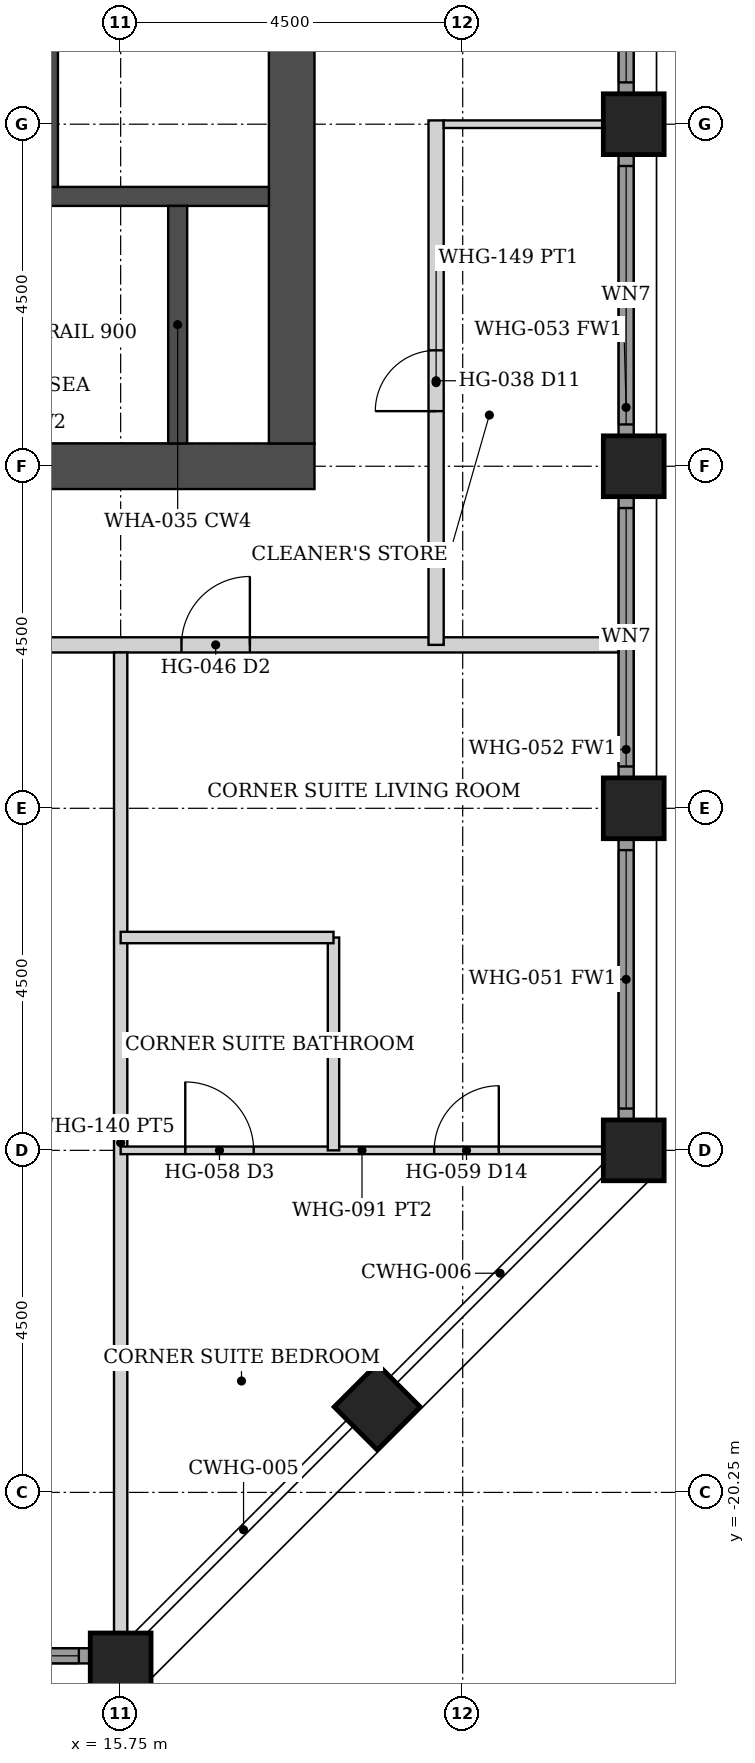
"""IFC4 building model, lengths in metres.
Left out: names, types, materials, properties, quantities, classifications, styles, units other than length and angle.
Written with IfcOpenShell. Run it as: python <this file> out.ifc"""

import sys

from ifc_helpers import new_model, si_unit, direction, frame, frame_2d, origin, origin_2d, place, context, subcontext, project, spatial, rectangle, hollow_rectangle, extrude, element, fill, save


model = new_model("IFC4")
c1 = context("Model", 3, precision=1e-05, world=origin(), true_north=direction((0.0, 1.0)))
c2 = subcontext(c1, "Body", "Model", "MODEL_VIEW")
j1 = project(units=[si_unit("LENGTHUNIT", "METRE"), si_unit("PLANEANGLEUNIT", "RADIAN")], contexts=[c1])
p1 = place(None, origin())
s1 = spatial("IfcSite", under=j1, at=p1, CompositionType="ELEMENT")
p2 = place(p1, origin())
s2 = spatial("IfcBuilding", under=s1, at=p2, CompositionType="ELEMENT")
p3 = place(p2, frame((0.0, 0.0, 186.8)))
s3 = spatial("IfcBuildingStorey", under=s2, at=p3, CompositionType="ELEMENT", Elevation=186.8)
for number, where, z_axis, x_axis in (
    (1, (22.5, -15.75, 0.0), (0.0, 0.0, 1.0), (1.0, 0.0, 0.0)),
    (2, (22.5, -11.25, 0.0), (0.0, 0.0, 1.0), (1.0, 0.0, 0.0)),
    (3, (22.5, -6.75, 0.0), (0.0, 0.0, 1.0), (1.0, 0.0, 0.0)),
    (4, (22.5, -2.25, 0.0), (0.0, 0.0, 1.0), (1.0, 0.0, 0.0)),
    (5, (15.75, -22.5, 0.0), (0.0, 0.0, 1.0), (0.0, 1.0, 0.0)),
    (6, (19.125, -19.125, 0.0), (0.0, 0.0, 1.0), (0.707, -0.707, 0.0)),
):
    element("IfcColumn", number, at=place(p3, frame(where, z_axis=z_axis, x_axis=x_axis)), inside=s3, PredefinedType="COLUMN", context=c2, shape_type="SweptSolid", body=[
        extrude(hollow_rectangle(XDim=0.8, YDim=0.8, WallThickness=0.045, at=origin_2d()), origin(), (0.0, 0.0, 1.0), 3.6),
    ])
p4 = place(p3, frame((8.7, -6.75, 0.0), z_axis=(0.0, 0.0, 1.0), x_axis=(1.0, 0.0, 0.0)))
e7 = element("IfcWall", 7, at=p4, inside=s3, PredefinedType="SHEAR", context=c2, shape_type="SweptSolid", body=[
    extrude(rectangle(XDim=9.6, YDim=0.6, at=frame_2d((4.8, 0.0))), origin(), (0.0, 0.0, 1.0), 3.6),
])
p5 = place(p3, frame((18.0, -6.45, 0.0), z_axis=(0.0, 0.0, 1.0), x_axis=(0.0, 1.0, 0.0)))
e8 = element("IfcWall", 8, at=p5, inside=s3, PredefinedType="SHEAR", context=c2, shape_type="SweptSolid", body=[
    extrude(rectangle(XDim=12.9, YDim=0.6, at=frame_2d((6.45, 0.0))), origin(), (0.0, 0.0, 1.0), 3.6),
])
p6 = place(p3, frame((9.3, -3.2, 0.0), z_axis=(0.0, 0.0, 1.0), x_axis=(1.0, 0.0, 0.0)))
e9 = element("IfcWall", 9, at=p6, inside=s3, PredefinedType="SHEAR", context=c2, shape_type="SweptSolid", body=[
    extrude(rectangle(XDim=8.4, YDim=0.25, at=frame_2d((4.2, 0.0))), origin(), (0.0, 0.0, 1.0), 3.6),
])
p7 = place(p6, frame((0.15, 0.0, 0.0)))
e10 = element("IfcOpeningElement", 10, at=p7, cuts=e9, PredefinedType="OPENING", context=c2, shape_type="SweptSolid", body=[
    extrude(rectangle(XDim=1.0, YDim=2.1, at=frame_2d((0.5, 1.05))), frame((0.0, 0.135, 0.0), z_axis=(0.0, -1.0, 0.0), x_axis=(1.0, 0.0, 0.0)), (0.0, 0.0, 1.0), 0.27),
])
p8 = place(p3, frame((16.5, -6.45, 0.0), z_axis=(0.0, 0.0, 1.0), x_axis=(0.0, 1.0, 0.0)))
e11 = element("IfcWall", 11, at=p8, inside=s3, PredefinedType="SHEAR", context=c2, shape_type="SweptSolid", body=[
    extrude(rectangle(XDim=3.125, YDim=0.25, at=frame_2d((1.562, 0.0))), origin(), (0.0, 0.0, 1.0), 3.6),
])
p9 = place(p3, frame((14.8, -3.075, 0.0), z_axis=(0.0, 0.0, 1.0), x_axis=(0.0, 1.0, 0.0)))
e12 = element("IfcWall", 12, at=p9, inside=s3, PredefinedType="SHEAR", context=c2, shape_type="SweptSolid", body=[
    extrude(rectangle(XDim=6.15, YDim=0.25, at=frame_2d((3.075, 0.0))), origin(), (0.0, 0.0, 1.0), 3.6),
])
p10 = place(p9, frame((2.4, 0.0, 0.0)))
e13 = element("IfcOpeningElement", 13, at=p10, cuts=e12, PredefinedType="OPENING", context=c2, shape_type="SweptSolid", body=[
    extrude(rectangle(XDim=1.1, YDim=2.1, at=frame_2d((0.55, 1.05))), frame((0.0, 0.135, 0.0), z_axis=(0.0, -1.0, 0.0), x_axis=(1.0, 0.0, 0.0)), (0.0, 0.0, 1.0), 0.27),
])
p11 = place(p9, frame((4.575, 0.0, 0.0)))
e14 = element("IfcOpeningElement", 14, at=p11, cuts=e12, PredefinedType="OPENING", context=c2, shape_type="SweptSolid", body=[
    extrude(rectangle(XDim=1.1, YDim=2.1, at=frame_2d((0.55, 1.05))), frame((0.0, 0.135, 0.0), z_axis=(0.0, -1.0, 0.0), x_axis=(1.0, 0.0, 0.0)), (0.0, 0.0, 1.0), 0.27),
])
p12 = place(p3, frame((11.655, -22.4, 0.0), z_axis=(0.0, 0.0, 1.0), x_axis=(1.0, 0.0, 0.0)))
e15 = element("IfcWall", 15, at=p12, inside=s3, PredefinedType="SOLIDWALL", context=c2, shape_type="SweptSolid", body=[
    extrude(rectangle(XDim=3.69, YDim=0.2, at=frame_2d((1.845, 0.0))), origin(), (0.0, 0.0, 1.0), 2.379),
])
p13 = place(p12, frame((0.145, 0.0, 0.3)))
e16 = element("IfcOpeningElement", 16, at=p13, cuts=e15, PredefinedType="OPENING", context=c2, shape_type="SweptSolid", body=[
    extrude(rectangle(XDim=3.4, YDim=1.929, at=frame_2d((1.7, 0.964))), frame((0.0, 0.11, 0.0), z_axis=(0.0, -1.0, 0.0), x_axis=(1.0, 0.0, 0.0)), (0.0, 0.0, 1.0), 0.22),
])
p14 = place(p3, frame((22.4, -15.345, 0.0), z_axis=(0.0, 0.0, 1.0), x_axis=(0.0, 1.0, 0.0)))
e17 = element("IfcWall", 17, at=p14, inside=s3, PredefinedType="SOLIDWALL", context=c2, shape_type="SweptSolid", body=[
    extrude(rectangle(XDim=3.69, YDim=0.2, at=frame_2d((1.845, 0.0))), origin(), (0.0, 0.0, 1.0), 2.379),
])
p15 = place(p14, frame((0.145, 0.0, 0.3)))
e18 = element("IfcOpeningElement", 18, at=p15, cuts=e17, PredefinedType="OPENING", context=c2, shape_type="SweptSolid", body=[
    extrude(rectangle(XDim=3.4, YDim=1.929, at=frame_2d((1.7, 0.964))), frame((0.0, 0.11, 0.0), z_axis=(0.0, -1.0, 0.0), x_axis=(1.0, 0.0, 0.0)), (0.0, 0.0, 1.0), 0.22),
])
p16 = place(p3, frame((22.4, -10.845, 0.0), z_axis=(0.0, 0.0, 1.0), x_axis=(0.0, 1.0, 0.0)))
e19 = element("IfcWall", 19, at=p16, inside=s3, PredefinedType="SOLIDWALL", context=c2, shape_type="SweptSolid", body=[
    extrude(rectangle(XDim=3.69, YDim=0.2, at=frame_2d((1.845, 0.0))), origin(), (0.0, 0.0, 1.0), 2.379),
])
p17 = place(p16, frame((0.145, 0.0, 0.3)))
e20 = element("IfcOpeningElement", 20, at=p17, cuts=e19, PredefinedType="OPENING", context=c2, shape_type="SweptSolid", body=[
    extrude(rectangle(XDim=3.4, YDim=1.929, at=frame_2d((1.7, 0.964))), frame((0.0, 0.11, 0.0), z_axis=(0.0, -1.0, 0.0), x_axis=(1.0, 0.0, 0.0)), (0.0, 0.0, 1.0), 0.22),
])
p18 = place(p3, frame((22.4, -6.345, 0.0), z_axis=(0.0, 0.0, 1.0), x_axis=(0.0, 1.0, 0.0)))
e21 = element("IfcWall", 21, at=p18, inside=s3, PredefinedType="SOLIDWALL", context=c2, shape_type="SweptSolid", body=[
    extrude(rectangle(XDim=3.69, YDim=0.2, at=frame_2d((1.845, 0.0))), origin(), (0.0, 0.0, 1.0), 2.379),
])
p19 = place(p18, frame((0.145, 0.0, 0.3)))
e22 = element("IfcOpeningElement", 22, at=p19, cuts=e21, PredefinedType="OPENING", context=c2, shape_type="SweptSolid", body=[
    extrude(rectangle(XDim=3.4, YDim=1.929, at=frame_2d((1.7, 0.964))), frame((0.0, 0.11, 0.0), z_axis=(0.0, -1.0, 0.0), x_axis=(1.0, 0.0, 0.0)), (0.0, 0.0, 1.0), 0.22),
])
p20 = place(p3, frame((22.4, -1.845, 0.0), z_axis=(0.0, 0.0, 1.0), x_axis=(0.0, 1.0, 0.0)))
e23 = element("IfcWall", 23, at=p20, inside=s3, PredefinedType="SOLIDWALL", context=c2, shape_type="SweptSolid", body=[
    extrude(rectangle(XDim=3.69, YDim=0.2, at=frame_2d((1.845, 0.0))), origin(), (0.0, 0.0, 1.0), 2.379),
])
p21 = place(p20, frame((0.145, 0.0, 0.3)))
e24 = element("IfcOpeningElement", 24, at=p21, cuts=e23, PredefinedType="OPENING", context=c2, shape_type="SweptSolid", body=[
    extrude(rectangle(XDim=3.4, YDim=1.929, at=frame_2d((1.7, 0.964))), frame((0.0, 0.11, 0.0), z_axis=(0.0, -1.0, 0.0), x_axis=(1.0, 0.0, 0.0)), (0.0, 0.0, 1.0), 0.22),
])
p22 = place(p3, frame((-22.3, -9.1, 0.0), z_axis=(0.0, 0.0, 1.0), x_axis=(1.0, 0.0, 0.0)))
e25 = element("IfcWall", 25, at=p22, inside=s3, PredefinedType="PARTITIONING", context=c2, shape_type="SweptSolid", body=[
    extrude(rectangle(XDim=44.6, YDim=0.2, at=frame_2d((22.3, 0.0))), origin(), (0.0, 0.0, 1.0), 2.379),
])
p23 = place(p22, frame((11.35, 0.0, 0.0)))
e26 = element("IfcOpeningElement", 26, at=p23, cuts=e25, PredefinedType="OPENING", context=c2, shape_type="SweptSolid", body=[
    extrude(rectangle(XDim=0.9, YDim=2.1, at=frame_2d((0.45, 1.05))), frame((0.0, 0.11, 0.0), z_axis=(0.0, -1.0, 0.0), x_axis=(1.0, 0.0, 0.0)), (0.0, 0.0, 1.0), 0.22),
])
p24 = place(p22, frame((15.75, 0.0, 0.0)))
e27 = element("IfcOpeningElement", 27, at=p24, cuts=e25, PredefinedType="OPENING", context=c2, shape_type="SweptSolid", body=[
    extrude(rectangle(XDim=0.9, YDim=2.1, at=frame_2d((0.45, 1.05))), frame((0.0, 0.11, 0.0), z_axis=(0.0, -1.0, 0.0), x_axis=(1.0, 0.0, 0.0)), (0.0, 0.0, 1.0), 0.22),
])
p25 = place(p22, frame((23.45, 0.0, 0.0)))
e28 = element("IfcOpeningElement", 28, at=p25, cuts=e25, PredefinedType="OPENING", context=c2, shape_type="SweptSolid", body=[
    extrude(rectangle(XDim=0.9, YDim=2.1, at=frame_2d((0.45, 1.05))), frame((0.0, 0.11, 0.0), z_axis=(0.0, -1.0, 0.0), x_axis=(1.0, 0.0, 0.0)), (0.0, 0.0, 1.0), 0.22),
])
p26 = place(p22, frame((24.75, 0.0, 0.0)))
e29 = element("IfcOpeningElement", 29, at=p26, cuts=e25, PredefinedType="OPENING", context=c2, shape_type="SweptSolid", body=[
    extrude(rectangle(XDim=0.9, YDim=2.1, at=frame_2d((0.45, 1.05))), frame((0.0, 0.11, 0.0), z_axis=(0.0, -1.0, 0.0), x_axis=(1.0, 0.0, 0.0)), (0.0, 0.0, 1.0), 0.22),
])
p27 = place(p22, frame((29.25, 0.0, 0.0)))
e30 = element("IfcOpeningElement", 30, at=p27, cuts=e25, PredefinedType="OPENING", context=c2, shape_type="SweptSolid", body=[
    extrude(rectangle(XDim=0.9, YDim=2.1, at=frame_2d((0.45, 1.05))), frame((0.0, 0.11, 0.0), z_axis=(0.0, -1.0, 0.0), x_axis=(1.0, 0.0, 0.0)), (0.0, 0.0, 1.0), 0.22),
])
p28 = place(p22, frame((38.85, 0.0, 0.0)))
e31 = element("IfcOpeningElement", 31, at=p28, cuts=e25, PredefinedType="OPENING", context=c2, shape_type="SweptSolid", body=[
    extrude(rectangle(XDim=0.9, YDim=2.1, at=frame_2d((0.45, 1.05))), frame((0.0, 0.11, 0.0), z_axis=(0.0, -1.0, 0.0), x_axis=(1.0, 0.0, 0.0)), (0.0, 0.0, 1.0), 0.22),
])
p29 = place(p22, frame((4.85, 0.0, 0.0)))
e32 = element("IfcOpeningElement", 32, at=p29, cuts=e25, PredefinedType="OPENING", context=c2, shape_type="SweptSolid", body=[
    extrude(rectangle(XDim=0.9, YDim=2.1, at=frame_2d((0.45, 1.05))), frame((0.0, 0.11, 0.0), z_axis=(0.0, -1.0, 0.0), x_axis=(1.0, 0.0, 0.0)), (0.0, 0.0, 1.0), 0.22),
])
p30 = place(p3, frame((19.9, -9.1, 0.0), z_axis=(0.0, 0.0, 1.0), x_axis=(0.0, 1.0, 0.0)))
e33 = element("IfcWall", 33, at=p30, inside=s3, PredefinedType="PARTITIONING", context=c2, shape_type="SweptSolid", body=[
    extrude(rectangle(XDim=6.9, YDim=0.2, at=frame_2d((3.45, 0.0))), origin(), (0.0, 0.0, 1.0), 2.379),
])
p31 = place(p30, frame((3.075, 0.0, 0.0)))
e34 = element("IfcOpeningElement", 34, at=p31, cuts=e33, PredefinedType="OPENING", context=c2, shape_type="SweptSolid", body=[
    extrude(rectangle(XDim=0.8, YDim=2.1, at=frame_2d((0.4, 1.05))), frame((0.0, 0.11, 0.0), z_axis=(0.0, -1.0, 0.0), x_axis=(1.0, 0.0, 0.0)), (0.0, 0.0, 1.0), 0.22),
])
p32 = place(p3, frame((15.75, -22.1, 0.0), z_axis=(0.0, 0.0, 1.0), x_axis=(0.0, 1.0, 0.0)))
e35 = element("IfcWall", 35, at=p32, inside=s3, PredefinedType="PARTITIONING", context=c2, shape_type="SweptSolid", body=[
    extrude(rectangle(XDim=12.9, YDim=0.175, at=frame_2d((6.45, 0.0))), origin(), (0.0, 0.0, 1.0), 2.379),
])
p33 = place(p3, frame((15.75, -15.75, 0.0), z_axis=(0.0, 0.0, 1.0), x_axis=(1.0, 0.0, 0.0)))
e36 = element("IfcWall", 36, at=p33, inside=s3, PredefinedType="PARTITIONING", context=c2, shape_type="SweptSolid", body=[
    extrude(rectangle(XDim=6.35, YDim=0.1, at=frame_2d((3.175, 0.0))), origin(), (0.0, 0.0, 1.0), 2.379),
])
p34 = place(p33, frame((4.125, 0.0, 0.0)))
e37 = element("IfcOpeningElement", 37, at=p34, cuts=e36, PredefinedType="OPENING", context=c2, shape_type="SweptSolid", body=[
    extrude(rectangle(XDim=0.85, YDim=2.1, at=frame_2d((0.425, 1.05))), frame((0.0, 0.06, 0.0), z_axis=(0.0, -1.0, 0.0), x_axis=(1.0, 0.0, 0.0)), (0.0, 0.0, 1.0), 0.12),
])
p35 = place(p33, frame((0.85, 0.0, 0.0)))
e38 = element("IfcOpeningElement", 38, at=p35, cuts=e36, PredefinedType="OPENING", context=c2, shape_type="SweptSolid", body=[
    extrude(rectangle(XDim=0.9, YDim=2.1, at=frame_2d((0.45, 1.05))), frame((0.0, 0.06, 0.0), z_axis=(0.0, -1.0, 0.0), x_axis=(1.0, 0.0, 0.0)), (0.0, 0.0, 1.0), 0.12),
])
for number, where, z_axis, x_axis in (
    (39, (18.55, -15.75, 0.0), (0.0, 0.0, 1.0), (0.0, 1.0, 0.0)),
    (40, (15.75, -12.95, 0.0), (0.0, 0.0, 1.0), (1.0, 0.0, 0.0)),
):
    element("IfcWall", number, at=place(p3, frame(where, z_axis=z_axis, x_axis=x_axis)), inside=s3, PredefinedType="PARTITIONING", context=c2, shape_type="SweptSolid", body=[
        extrude(rectangle(XDim=2.8, YDim=0.15, at=frame_2d((1.4, 0.0))), origin(), (0.0, 0.0, 1.0), 2.379),
    ])
p36 = place(p3, frame((20.0, -2.25, 0.0), z_axis=(0.0, 0.0, 1.0), x_axis=(1.0, 0.0, 0.0)))
e41 = element("IfcWall", 41, at=p36, inside=s3, PredefinedType="PARTITIONING", context=c2, shape_type="SweptSolid", body=[
    extrude(rectangle(XDim=2.1, YDim=0.1, at=frame_2d((1.05, 0.0))), origin(), (0.0, 0.0, 1.0), 2.379),
])
p37 = place(p13, origin())
e42 = element("IfcWindow", 42, at=p37, inside=s3, PartitioningType="SINGLE_PANEL", PredefinedType="WINDOW", context=c2, shape_type="SweptSolid", body=[
    extrude(rectangle(XDim=3.4, YDim=1.929, at=frame_2d((1.7, 0.964))), frame((0.0, 0.03, 0.0), z_axis=(0.0, -1.0, 0.0), x_axis=(1.0, 0.0, 0.0)), (0.0, 0.0, 1.0), 0.06),
])
fill(e16, e42)
p38 = place(p15, origin())
e43 = element("IfcWindow", 43, at=p38, inside=s3, PartitioningType="SINGLE_PANEL", PredefinedType="WINDOW", context=c2, shape_type="SweptSolid", body=[
    extrude(rectangle(XDim=3.4, YDim=1.929, at=frame_2d((1.7, 0.964))), frame((0.0, 0.03, 0.0), z_axis=(0.0, -1.0, 0.0), x_axis=(1.0, 0.0, 0.0)), (0.0, 0.0, 1.0), 0.06),
])
fill(e18, e43)
p39 = place(p17, origin())
e44 = element("IfcWindow", 44, at=p39, inside=s3, PartitioningType="SINGLE_PANEL", PredefinedType="WINDOW", context=c2, shape_type="SweptSolid", body=[
    extrude(rectangle(XDim=3.4, YDim=1.929, at=frame_2d((1.7, 0.964))), frame((0.0, 0.03, 0.0), z_axis=(0.0, -1.0, 0.0), x_axis=(1.0, 0.0, 0.0)), (0.0, 0.0, 1.0), 0.06),
])
fill(e20, e44)
p40 = place(p19, origin())
e45 = element("IfcWindow", 45, at=p40, inside=s3, PartitioningType="SINGLE_PANEL", PredefinedType="WINDOW", context=c2, shape_type="SweptSolid", body=[
    extrude(rectangle(XDim=3.4, YDim=1.929, at=frame_2d((1.7, 0.964))), frame((0.0, 0.03, 0.0), z_axis=(0.0, -1.0, 0.0), x_axis=(1.0, 0.0, 0.0)), (0.0, 0.0, 1.0), 0.06),
])
fill(e22, e45)
p41 = place(p21, origin())
e46 = element("IfcWindow", 46, at=p41, inside=s3, PartitioningType="SINGLE_PANEL", PredefinedType="WINDOW", context=c2, shape_type="SweptSolid", body=[
    extrude(rectangle(XDim=3.4, YDim=1.929, at=frame_2d((1.7, 0.964))), frame((0.0, 0.03, 0.0), z_axis=(0.0, -1.0, 0.0), x_axis=(1.0, 0.0, 0.0)), (0.0, 0.0, 1.0), 0.06),
])
fill(e24, e46)
p42 = place(p28, origin())
e47 = element("IfcDoor", 47, at=p42, inside=s3, OperationType="SINGLE_SWING_RIGHT", PredefinedType="DOOR", context=c2, shape_type="SweptSolid", body=[
    extrude(rectangle(XDim=0.9, YDim=2.1, at=frame_2d((0.45, 1.05))), frame((0.0, 0.025, 0.0), z_axis=(0.0, -1.0, 0.0), x_axis=(1.0, 0.0, 0.0)), (0.0, 0.0, 1.0), 0.05),
])
fill(e31, e47)
p43 = place(p34, origin())
e48 = element("IfcDoor", 48, at=p43, inside=s3, OperationType="SINGLE_SWING_RIGHT", PredefinedType="DOOR", context=c2, shape_type="SweptSolid", body=[
    extrude(rectangle(XDim=0.85, YDim=2.1, at=frame_2d((0.425, 1.05))), frame((0.0, 0.025, 0.0), z_axis=(0.0, -1.0, 0.0), x_axis=(1.0, 0.0, 0.0)), (0.0, 0.0, 1.0), 0.05),
])
fill(e37, e48)
p44 = place(p35, origin())
e49 = element("IfcDoor", 49, at=p44, inside=s3, OperationType="SINGLE_SWING_LEFT", PredefinedType="DOOR", context=c2, shape_type="SweptSolid", body=[
    extrude(rectangle(XDim=0.9, YDim=2.1, at=frame_2d((0.45, 1.05))), frame((0.0, 0.025, 0.0), z_axis=(0.0, -1.0, 0.0), x_axis=(1.0, 0.0, 0.0)), (0.0, 0.0, 1.0), 0.05),
])
fill(e38, e49)
p45 = place(p31, origin())
e50 = element("IfcDoor", 50, at=p45, inside=s3, OperationType="SINGLE_SWING_LEFT", PredefinedType="DOOR", context=c2, shape_type="SweptSolid", body=[
    extrude(rectangle(XDim=0.8, YDim=2.1, at=frame_2d((0.4, 1.05))), frame((0.0, 0.025, 0.0), z_axis=(0.0, -1.0, 0.0), x_axis=(1.0, 0.0, 0.0)), (0.0, 0.0, 1.0), 0.05),
])
fill(e34, e50)
save(model, sys.argv[1])
